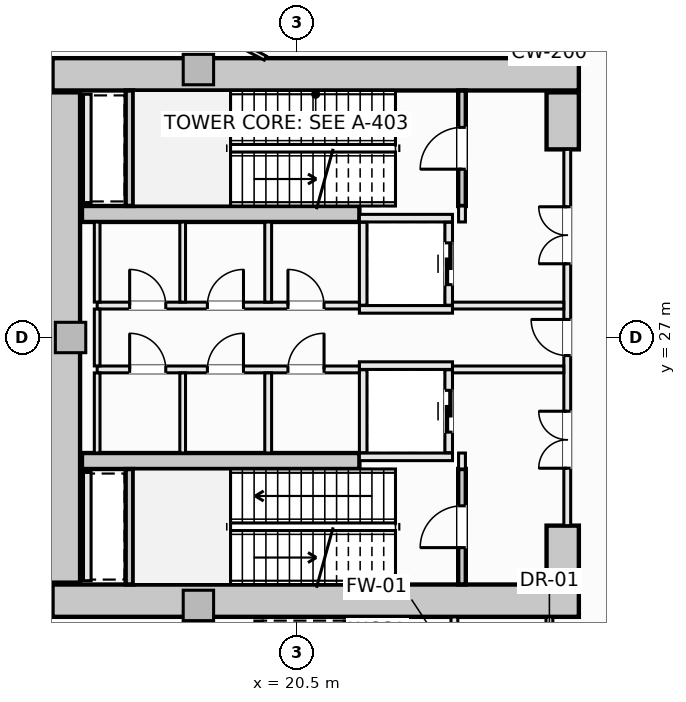
"""IFC4 building model, lengths in metres.
Left out: names, types, materials, properties, quantities, classifications, styles, units other than length and angle.
Written with IfcOpenShell. Run it as: python <this file> out.ifc"""

import sys

from ifc_helpers import new_model, si_unit, direction, frame, frame_2d, origin, origin_2d, place, context, subcontext, project, spatial, rectangle, extrude, element, fill, save


model = new_model("IFC4")
c1 = context("Model", 3, precision=1e-05, world=origin(), true_north=direction((0.0, 1.0)))
c2 = subcontext(c1, "Body", "Model", "MODEL_VIEW")
j1 = project(units=[si_unit("LENGTHUNIT", "METRE"), si_unit("PLANEANGLEUNIT", "RADIAN")], contexts=[c1])
p1 = place(None, origin())
s1 = spatial("IfcSite", under=j1, at=p1, CompositionType="ELEMENT")
p2 = place(p1, origin())
s2 = spatial("IfcBuilding", under=s1, at=p2, CompositionType="ELEMENT")
p3 = place(p2, frame((0.0, 0.0, 5.0)))
s3 = spatial("IfcBuildingStorey", under=s2, at=p3, CompositionType="ELEMENT", Elevation=5.0)
for number, where, z_axis, x_axis in (
    (1, (14.075, 33.925, -0.26), (0.0, 0.0, 1.0), (1.0, 0.0, 0.0)),
    (2, (14.075, 20.075, -0.26), (0.0, 0.0, 1.0), (1.0, 0.0, 0.0)),
):
    element("IfcWall", number, at=place(p3, frame(where, z_axis=z_axis, x_axis=x_axis)), inside=s3, PredefinedType="SHEAR", context=c2, shape_type="SweptSolid", body=[
        extrude(rectangle(XDim=13.85, YDim=0.85, at=frame_2d((6.925, 0.0))), origin(), (0.0, 0.0, 1.0), 5.0),
    ])
p4 = place(p3, frame((14.375, 20.55, -0.26), z_axis=(0.0, 0.0, 1.0), x_axis=(0.0, 1.0, 0.0)))
e3 = element("IfcWall", 3, at=p4, inside=s3, PredefinedType="SHEAR", context=c2, shape_type="SweptSolid", body=[
    extrude(rectangle(XDim=12.9, YDim=0.85, at=frame_2d((6.45, 0.0))), origin(), (0.0, 0.0, 1.0), 5.0),
])
for number, where, z_axis, x_axis in (
    (4, (27.5, 31.95, -0.26), (0.0, 0.0, 1.0), (0.0, 1.0, 0.0)),
    (5, (27.5, 20.55, -0.26), (0.0, 0.0, 1.0), (0.0, 1.0, 0.0)),
):
    element("IfcWall", number, at=place(p3, frame(where, z_axis=z_axis, x_axis=x_axis)), inside=s3, PredefinedType="SHEAR", context=c2, shape_type="SweptSolid", body=[
        extrude(rectangle(XDim=1.5, YDim=0.85, at=frame_2d((0.75, 0.0))), origin(), (0.0, 0.0, 1.0), 5.0),
    ])
for number, where, z_axis, x_axis in (
    (6, (14.85, 30.25, -0.26), (0.0, 0.0, 1.0), (1.0, 0.0, 0.0)),
    (7, (14.85, 23.75, -0.26), (0.0, 0.0, 1.0), (1.0, 0.0, 0.0)),
):
    element("IfcWall", number, at=place(p3, frame(where, z_axis=z_axis, x_axis=x_axis)), inside=s3, PredefinedType="SHEAR", context=c2, shape_type="SweptSolid", body=[
        extrude(rectangle(XDim=7.3, YDim=0.42, at=frame_2d((3.65, 0.0))), origin(), (0.0, 0.0, 1.0), 5.0),
    ])
for number, where, z_axis, x_axis in (
    (8, (17.914, 34.05, -0.26), (0.0, 0.0, 1.0), (1.0, 0.0, 0.0)),
    (9, (14.55, 27.0, -0.26), (0.0, 0.0, 1.0), (1.0, 0.0, 0.0)),
    (10, (17.914, 19.95, -0.26), (0.0, 0.0, 1.0), (1.0, 0.0, 0.0)),
):
    element("IfcColumn", number, at=place(p3, frame(where, z_axis=z_axis, x_axis=x_axis)), inside=s3, PredefinedType="PILASTER", context=c2, shape_type="SweptSolid", body=[
        extrude(rectangle(XDim=0.8, YDim=0.8, at=origin_2d()), origin(), (0.0, 0.0, 1.0), 5.0),
    ])
p5 = place(p3, frame((24.85, 30.46, -0.26), z_axis=(0.0, 0.0, 1.0), x_axis=(0.0, 1.0, 0.0)))
e11 = element("IfcWall", 11, at=p5, inside=s3, PredefinedType="SHEAR", context=c2, shape_type="SweptSolid", body=[
    extrude(rectangle(XDim=3.038, YDim=0.2, at=frame_2d((1.519, 0.0))), origin(), (0.0, 0.0, 1.0), 5.0),
])
p6 = place(p5, frame((0.969, 0.0, 0.26)))
e12 = element("IfcOpeningElement", 12, at=p6, cuts=e11, PredefinedType="OPENING", context=c2, shape_type="SweptSolid", body=[
    extrude(rectangle(XDim=1.1, YDim=2.15, at=frame_2d((0.55, 1.075))), frame((0.0, 0.11, 0.0), z_axis=(0.0, -1.0, 0.0), x_axis=(1.0, 0.0, 0.0)), (0.0, 0.0, 1.0), 0.22),
])
p7 = place(p3, frame((16.1, 30.462, -0.26), z_axis=(0.0, 0.0, 1.0), x_axis=(0.0, 1.0, 0.0)))
e13 = element("IfcWall", 13, at=p7, inside=s3, PredefinedType="SHEAR", context=c2, shape_type="SweptSolid", body=[
    extrude(rectangle(XDim=3.036, YDim=0.2, at=frame_2d((1.518, 0.0))), origin(), (0.0, 0.0, 1.0), 5.0),
])
p8 = place(p3, frame((24.85, 20.502, -0.26), z_axis=(0.0, 0.0, 1.0), x_axis=(0.0, 1.0, 0.0)))
e14 = element("IfcWall", 14, at=p8, inside=s3, PredefinedType="SHEAR", context=c2, shape_type="SweptSolid", body=[
    extrude(rectangle(XDim=3.038, YDim=0.2, at=frame_2d((1.519, 0.0))), origin(), (0.0, 0.0, 1.0), 5.0),
])
p9 = place(p8, frame((0.969, 0.0, 0.26)))
e15 = element("IfcOpeningElement", 15, at=p9, cuts=e14, PredefinedType="OPENING", context=c2, shape_type="SweptSolid", body=[
    extrude(rectangle(XDim=1.1, YDim=2.15, at=frame_2d((0.55, 1.075))), frame((0.0, 0.11, 0.0), z_axis=(0.0, -1.0, 0.0), x_axis=(1.0, 0.0, 0.0)), (0.0, 0.0, 1.0), 0.22),
])
p10 = place(p3, frame((16.1, 20.502, -0.26), z_axis=(0.0, 0.0, 1.0), x_axis=(0.0, 1.0, 0.0)))
e16 = element("IfcWall", 16, at=p10, inside=s3, PredefinedType="SHEAR", context=c2, shape_type="SweptSolid", body=[
    extrude(rectangle(XDim=3.036, YDim=0.2, at=frame_2d((1.518, 0.0))), origin(), (0.0, 0.0, 1.0), 5.0),
])
for number, where, z_axis, x_axis in (
    (17, (22.15, 30.14, 0.0), (0.0, 0.0, 1.0), (1.0, 0.0, 0.0)),
    (18, (22.15, 27.74, 0.0), (0.0, 0.0, 1.0), (1.0, 0.0, 0.0)),
):
    element("IfcWall", number, at=place(p3, frame(where, z_axis=z_axis, x_axis=x_axis)), inside=s3, PredefinedType="SOLIDWALL", context=c2, shape_type="SweptSolid", body=[
        extrude(rectangle(XDim=2.45, YDim=0.2, at=frame_2d((1.225, 0.0))), origin(), (0.0, 0.0, 1.0), 4.74),
    ])
p11 = place(p3, frame((22.25, 27.85, 0.0), z_axis=(0.0, 0.0, 1.0), x_axis=(0.0, 1.0, 0.0)))
e19 = element("IfcWall", 19, at=p11, inside=s3, PredefinedType="SOLIDWALL", context=c2, shape_type="SweptSolid", body=[
    extrude(rectangle(XDim=2.18, YDim=0.2, at=frame_2d((1.09, 0.0))), origin(), (0.0, 0.0, 1.0), 4.74),
])
p12 = place(p3, frame((24.5, 27.85, 0.0), z_axis=(0.0, 0.0, 1.0), x_axis=(0.0, 1.0, 0.0)))
e20 = element("IfcWall", 20, at=p12, inside=s3, PredefinedType="SOLIDWALL", context=c2, shape_type="SweptSolid", body=[
    extrude(rectangle(XDim=2.18, YDim=0.2, at=frame_2d((1.09, 0.0))), origin(), (0.0, 0.0, 1.0), 4.74),
])
p13 = place(p12, frame((0.54, 0.0, 0.0)))
e21 = element("IfcOpeningElement", 21, at=p13, cuts=e20, PredefinedType="OPENING", context=c2, shape_type="SweptSolid", body=[
    extrude(rectangle(XDim=1.1, YDim=2.2, at=frame_2d((0.55, 1.1))), frame((0.0, 0.11, 0.0), z_axis=(0.0, -1.0, 0.0), x_axis=(1.0, 0.0, 0.0)), (0.0, 0.0, 1.0), 0.22),
])
for number, where, z_axis, x_axis in (
    (22, (22.15, 26.26, 0.0), (0.0, 0.0, 1.0), (1.0, 0.0, 0.0)),
    (23, (22.15, 23.86, 0.0), (0.0, 0.0, 1.0), (1.0, 0.0, 0.0)),
):
    element("IfcWall", number, at=place(p3, frame(where, z_axis=z_axis, x_axis=x_axis)), inside=s3, PredefinedType="SOLIDWALL", context=c2, shape_type="SweptSolid", body=[
        extrude(rectangle(XDim=2.45, YDim=0.2, at=frame_2d((1.225, 0.0))), origin(), (0.0, 0.0, 1.0), 4.74),
    ])
p14 = place(p3, frame((22.25, 23.97, 0.0), z_axis=(0.0, 0.0, 1.0), x_axis=(0.0, 1.0, 0.0)))
e24 = element("IfcWall", 24, at=p14, inside=s3, PredefinedType="SOLIDWALL", context=c2, shape_type="SweptSolid", body=[
    extrude(rectangle(XDim=2.18, YDim=0.2, at=frame_2d((1.09, 0.0))), origin(), (0.0, 0.0, 1.0), 4.74),
])
p15 = place(p3, frame((24.5, 23.97, 0.0), z_axis=(0.0, 0.0, 1.0), x_axis=(0.0, 1.0, 0.0)))
e25 = element("IfcWall", 25, at=p15, inside=s3, PredefinedType="SOLIDWALL", context=c2, shape_type="SweptSolid", body=[
    extrude(rectangle(XDim=2.18, YDim=0.2, at=frame_2d((1.09, 0.0))), origin(), (0.0, 0.0, 1.0), 4.74),
])
p16 = place(p15, frame((0.54, 0.0, 0.0)))
e26 = element("IfcOpeningElement", 26, at=p16, cuts=e25, PredefinedType="OPENING", context=c2, shape_type="SweptSolid", body=[
    extrude(rectangle(XDim=1.1, YDim=2.2, at=frame_2d((0.55, 1.1))), frame((0.0, 0.11, 0.0), z_axis=(0.0, -1.0, 0.0), x_axis=(1.0, 0.0, 0.0)), (0.0, 0.0, 1.0), 0.22),
])
for number, where, z_axis, x_axis in (
    (27, (19.5, 17.01, 0.0), (0.0, 0.0, 1.0), (0.0, 1.0, 0.0)),
    (28, (21.85, 17.01, 0.0), (0.0, 0.0, 1.0), (0.0, 1.0, 0.0)),
):
    element("IfcWall", number, at=place(p3, frame(where, z_axis=z_axis, x_axis=x_axis)), inside=s3, PredefinedType="SOLIDWALL", context=c2, shape_type="SweptSolid", body=[
        extrude(rectangle(XDim=2.53, YDim=0.2, at=frame_2d((1.265, 0.0))), origin(), (0.0, 0.0, 1.0), 4.74),
    ])
for number, where, z_axis, x_axis in (
    (29, (14.99, 30.55, 0.0), (0.0, 0.0, 1.0), (0.0, 1.0, 0.0)),
    (30, (14.99, 20.6, 0.0), (0.0, 0.0, 1.0), (0.0, 1.0, 0.0)),
):
    element("IfcWall", number, at=place(p3, frame(where, z_axis=z_axis, x_axis=x_axis)), inside=s3, PredefinedType="SOLIDWALL", context=c2, shape_type="SweptSolid", body=[
        extrude(rectangle(XDim=2.85, YDim=0.2, at=frame_2d((1.425, 0.0))), origin(), (0.0, 0.0, 1.0), 4.74),
    ])
for number, where, z_axis, x_axis in (
    (31, (24.85, 23.54, 0.0), (0.0, 0.0, 1.0), (0.0, 1.0, 0.0)),
    (32, (24.85, 30.04, 0.0), (0.0, 0.0, 1.0), (0.0, 1.0, 0.0)),
):
    element("IfcWall", number, at=place(p3, frame(where, z_axis=z_axis, x_axis=x_axis)), inside=s3, PredefinedType="SOLIDWALL", context=c2, shape_type="SweptSolid", body=[
        extrude(rectangle(XDim=0.42, YDim=0.18, at=frame_2d((0.21, 0.0))), origin(), (0.0, 0.0, 1.0), 4.74),
    ])
p17 = place(p3, frame((27.62, 22.05, 0.0), z_axis=(0.0, 0.0, 1.0), x_axis=(0.0, 1.0, 0.0)))
e33 = element("IfcWall", 33, at=p17, inside=s3, PredefinedType="SOLIDWALL", context=c2, shape_type="SweptSolid", body=[
    extrude(rectangle(XDim=9.9, YDim=0.18, at=frame_2d((4.95, 0.0))), origin(), (0.0, 0.0, 1.0), 3.832),
])
p18 = place(p17, frame((4.475, 0.0, 0.0)))
e34 = element("IfcOpeningElement", 34, at=p18, cuts=e33, PredefinedType="OPENING", context=c2, shape_type="SweptSolid", body=[
    extrude(rectangle(XDim=0.95, YDim=2.1, at=frame_2d((0.475, 1.05))), frame((0.0, 0.1, 0.0), z_axis=(0.0, -1.0, 0.0), x_axis=(1.0, 0.0, 0.0)), (0.0, 0.0, 1.0), 0.2),
])
p19 = place(p17, frame((6.89, 0.0, 0.0)))
e35 = element("IfcOpeningElement", 35, at=p19, cuts=e33, PredefinedType="OPENING", context=c2, shape_type="SweptSolid", body=[
    extrude(rectangle(XDim=1.5, YDim=2.2, at=frame_2d((0.75, 1.1))), frame((0.0, 0.1, 0.0), z_axis=(0.0, -1.0, 0.0), x_axis=(1.0, 0.0, 0.0)), (0.0, 0.0, 1.0), 0.2),
])
p20 = place(p17, frame((1.51, 0.0, 0.0)))
e36 = element("IfcOpeningElement", 36, at=p20, cuts=e33, PredefinedType="OPENING", context=c2, shape_type="SweptSolid", body=[
    extrude(rectangle(XDim=1.5, YDim=2.2, at=frame_2d((0.75, 1.1))), frame((0.0, 0.1, 0.0), z_axis=(0.0, -1.0, 0.0), x_axis=(1.0, 0.0, 0.0)), (0.0, 0.0, 1.0), 0.2),
])
p21 = place(p3, frame((15.25, 27.84, 0.0), z_axis=(0.0, 0.0, 1.0), x_axis=(1.0, 0.0, 0.0)))
e37 = element("IfcWall", 37, at=p21, inside=s3, PredefinedType="SOLIDWALL", context=c2, shape_type="SweptSolid", body=[
    extrude(rectangle(XDim=6.9, YDim=0.18, at=frame_2d((3.45, 0.0))), origin(), (0.0, 0.0, 1.0), 4.74),
])
p22 = place(p21, frame((5.02, 0.0, 0.0)))
e38 = element("IfcOpeningElement", 38, at=p22, cuts=e37, PredefinedType="OPENING", context=c2, shape_type="SweptSolid", body=[
    extrude(rectangle(XDim=0.95, YDim=2.1, at=frame_2d((0.475, 1.05))), frame((0.0, 0.1, 0.0), z_axis=(0.0, -1.0, 0.0), x_axis=(1.0, 0.0, 0.0)), (0.0, 0.0, 1.0), 0.2),
])
p23 = place(p21, frame((0.855, 0.0, 0.0)))
e39 = element("IfcOpeningElement", 39, at=p23, cuts=e37, PredefinedType="OPENING", context=c2, shape_type="SweptSolid", body=[
    extrude(rectangle(XDim=0.95, YDim=2.1, at=frame_2d((0.475, 1.05))), frame((0.0, 0.1, 0.0), z_axis=(0.0, -1.0, 0.0), x_axis=(1.0, 0.0, 0.0)), (0.0, 0.0, 1.0), 0.2),
])
p24 = place(p21, frame((2.9, 0.0, 0.0)))
e40 = element("IfcOpeningElement", 40, at=p24, cuts=e37, PredefinedType="OPENING", context=c2, shape_type="SweptSolid", body=[
    extrude(rectangle(XDim=0.95, YDim=2.1, at=frame_2d((0.475, 1.05))), frame((0.0, 0.1, 0.0), z_axis=(0.0, -1.0, 0.0), x_axis=(1.0, 0.0, 0.0)), (0.0, 0.0, 1.0), 0.2),
])
p25 = place(p3, frame((24.6, 27.84, 0.0), z_axis=(0.0, 0.0, 1.0), x_axis=(1.0, 0.0, 0.0)))
e41 = element("IfcWall", 41, at=p25, inside=s3, PredefinedType="SOLIDWALL", context=c2, shape_type="SweptSolid", body=[
    extrude(rectangle(XDim=2.928, YDim=0.18, at=frame_2d((1.464, 0.0))), origin(), (0.0, 0.0, 1.0), 4.74),
])
p26 = place(p3, frame((15.25, 26.16, 0.0), z_axis=(0.0, 0.0, 1.0), x_axis=(1.0, 0.0, 0.0)))
e42 = element("IfcWall", 42, at=p26, inside=s3, PredefinedType="SOLIDWALL", context=c2, shape_type="SweptSolid", body=[
    extrude(rectangle(XDim=6.9, YDim=0.18, at=frame_2d((3.45, 0.0))), origin(), (0.0, 0.0, 1.0), 4.74),
])
p27 = place(p26, frame((5.02, 0.0, 0.0)))
e43 = element("IfcOpeningElement", 43, at=p27, cuts=e42, PredefinedType="OPENING", context=c2, shape_type="SweptSolid", body=[
    extrude(rectangle(XDim=0.95, YDim=2.1, at=frame_2d((0.475, 1.05))), frame((0.0, 0.1, 0.0), z_axis=(0.0, -1.0, 0.0), x_axis=(1.0, 0.0, 0.0)), (0.0, 0.0, 1.0), 0.2),
])
p28 = place(p26, frame((0.855, 0.0, 0.0)))
e44 = element("IfcOpeningElement", 44, at=p28, cuts=e42, PredefinedType="OPENING", context=c2, shape_type="SweptSolid", body=[
    extrude(rectangle(XDim=0.95, YDim=2.1, at=frame_2d((0.475, 1.05))), frame((0.0, 0.1, 0.0), z_axis=(0.0, -1.0, 0.0), x_axis=(1.0, 0.0, 0.0)), (0.0, 0.0, 1.0), 0.2),
])
p29 = place(p26, frame((2.9, 0.0, 0.0)))
e45 = element("IfcOpeningElement", 45, at=p29, cuts=e42, PredefinedType="OPENING", context=c2, shape_type="SweptSolid", body=[
    extrude(rectangle(XDim=0.95, YDim=2.1, at=frame_2d((0.475, 1.05))), frame((0.0, 0.1, 0.0), z_axis=(0.0, -1.0, 0.0), x_axis=(1.0, 0.0, 0.0)), (0.0, 0.0, 1.0), 0.2),
])
p30 = place(p3, frame((24.6, 26.16, 0.0), z_axis=(0.0, 0.0, 1.0), x_axis=(1.0, 0.0, 0.0)))
e46 = element("IfcWall", 46, at=p30, inside=s3, PredefinedType="SOLIDWALL", context=c2, shape_type="SweptSolid", body=[
    extrude(rectangle(XDim=2.928, YDim=0.18, at=frame_2d((1.464, 0.0))), origin(), (0.0, 0.0, 1.0), 4.74),
])
p31 = place(p3, frame((15.25, 23.962, 0.0), z_axis=(0.0, 0.0, 1.0), x_axis=(0.0, 1.0, 0.0)))
e47 = element("IfcWall", 47, at=p31, inside=s3, PredefinedType="PARTITIONING", context=c2, shape_type="SweptSolid", body=[
    extrude(rectangle(XDim=2.106, YDim=0.15, at=frame_2d((1.053, 0.0))), origin(), (0.0, 0.0, 1.0), 4.74),
])
p32 = place(p3, frame((15.25, 26.252, 0.0), z_axis=(0.0, 0.0, 1.0), x_axis=(0.0, 1.0, 0.0)))
e48 = element("IfcWall", 48, at=p32, inside=s3, PredefinedType="PARTITIONING", context=c2, shape_type="SweptSolid", body=[
    extrude(rectangle(XDim=1.496, YDim=0.15, at=frame_2d((0.748, 0.0))), origin(), (0.0, 0.0, 1.0), 4.74),
])
p33 = place(p3, frame((15.25, 27.932, 0.0), z_axis=(0.0, 0.0, 1.0), x_axis=(0.0, 1.0, 0.0)))
e49 = element("IfcWall", 49, at=p33, inside=s3, PredefinedType="PARTITIONING", context=c2, shape_type="SweptSolid", body=[
    extrude(rectangle(XDim=2.106, YDim=0.15, at=frame_2d((1.053, 0.0))), origin(), (0.0, 0.0, 1.0), 4.74),
])
for number, where, z_axis, x_axis in (
    (50, (19.75, 23.962, 0.0), (0.0, 0.0, 1.0), (0.0, 1.0, 0.0)),
    (51, (19.75, 27.932, 0.0), (0.0, 0.0, 1.0), (0.0, 1.0, 0.0)),
):
    element("IfcWall", number, at=place(p3, frame(where, z_axis=z_axis, x_axis=x_axis)), inside=s3, PredefinedType="SOLIDWALL", context=c2, shape_type="SweptSolid", body=[
        extrude(rectangle(XDim=2.106, YDim=0.18, at=frame_2d((1.053, 0.0))), origin(), (0.0, 0.0, 1.0), 4.74),
    ])
for number, where, z_axis, x_axis in (
    (52, (17.5, 23.962, 0.0), (0.0, 0.0, 1.0), (0.0, 1.0, 0.0)),
    (53, (17.5, 27.932, 0.0), (0.0, 0.0, 1.0), (0.0, 1.0, 0.0)),
):
    element("IfcWall", number, at=place(p3, frame(where, z_axis=z_axis, x_axis=x_axis)), inside=s3, PredefinedType="PARTITIONING", context=c2, shape_type="SweptSolid", body=[
        extrude(rectangle(XDim=2.106, YDim=0.15, at=frame_2d((1.053, 0.0))), origin(), (0.0, 0.0, 1.0), 4.74),
    ])
p34 = place(p3, frame((22.15, 17.142, 0.0), z_axis=(0.0, 0.0, 1.0), x_axis=(0.0, 1.0, 0.0)))
e54 = element("IfcWall", 54, at=p34, inside=s3, PredefinedType="PARTITIONING", context=c2, shape_type="SweptSolid", body=[
    extrude(rectangle(XDim=2.506, YDim=0.15, at=frame_2d((1.253, 0.0))), origin(), (0.0, 0.0, 1.0), 4.74),
])
p35 = place(p3, frame((24.65, 17.142, 0.0), z_axis=(0.0, 0.0, 1.0), x_axis=(0.0, 1.0, 0.0)))
e55 = element("IfcWall", 55, at=p35, inside=s3, PredefinedType="SOLIDWALL", context=c2, shape_type="SweptSolid", body=[
    extrude(rectangle(XDim=2.506, YDim=0.18, at=frame_2d((1.253, 0.0))), origin(), (0.0, 0.0, 1.0), 4.74),
])
p36 = place(p35, frame((0.778, 0.0, 0.0)))
e56 = element("IfcOpeningElement", 56, at=p36, cuts=e55, PredefinedType="OPENING", context=c2, shape_type="SweptSolid", body=[
    extrude(rectangle(XDim=0.95, YDim=2.1, at=frame_2d((0.475, 1.05))), frame((0.0, 0.1, 0.0), z_axis=(0.0, -1.0, 0.0), x_axis=(1.0, 0.0, 0.0)), (0.0, 0.0, 1.0), 0.2),
])
p37 = place(p3, frame((27.15, 17.142, 0.0), z_axis=(0.0, 0.0, 1.0), x_axis=(0.0, 1.0, 0.0)))
e57 = element("IfcWall", 57, at=p37, inside=s3, PredefinedType="SOLIDWALL", context=c2, shape_type="SweptSolid", body=[
    extrude(rectangle(XDim=2.506, YDim=0.18, at=frame_2d((1.253, 0.0))), origin(), (0.0, 0.0, 1.0), 4.74),
])
p38 = place(p37, frame((0.778, 0.0, 0.0)))
e58 = element("IfcOpeningElement", 58, at=p38, cuts=e57, PredefinedType="OPENING", context=c2, shape_type="SweptSolid", body=[
    extrude(rectangle(XDim=0.95, YDim=2.1, at=frame_2d((0.475, 1.05))), frame((0.0, 0.1, 0.0), z_axis=(0.0, -1.0, 0.0), x_axis=(1.0, 0.0, 0.0)), (0.0, 0.0, 1.0), 0.2),
])
p39 = place(p3, frame((27.25, 34.352, 0.0), z_axis=(0.0, 0.0, 1.0), x_axis=(0.0, 1.0, 0.0)))
e59 = element("IfcWall", 59, at=p39, inside=s3, PredefinedType="PARTITIONING", context=c2, shape_type="SweptSolid", body=[
    extrude(rectangle(XDim=0.606, YDim=0.12, at=frame_2d((0.303, 0.0))), origin(), (0.0, 0.0, 1.0), 4.74),
])
p40 = place(p3, frame((18.533, 34.958, 0.0), z_axis=(0.0, 0.0, 1.0), x_axis=(0.883032467315, -0.469311902329, 0.0)))
e60 = element("IfcWall", 60, at=p40, inside=s3, PredefinedType="PARTITIONING", context=c2, shape_type="SweptSolid", body=[
    extrude(rectangle(XDim=1.291, YDim=0.12, at=frame_2d((0.646, 0.0))), origin(), (0.0, 0.0, 1.0), 4.74),
])
p41 = place(p6, origin())
e61 = element("IfcDoor", 61, at=p41, inside=s3, OperationType="SINGLE_SWING_LEFT", PredefinedType="DOOR", context=c2, shape_type="SweptSolid", body=[
    extrude(rectangle(XDim=1.1, YDim=2.15, at=frame_2d((0.55, 1.075))), frame((0.0, 0.025, 0.0), z_axis=(0.0, -1.0, 0.0), x_axis=(1.0, 0.0, 0.0)), (0.0, 0.0, 1.0), 0.05),
])
fill(e12, e61)
p42 = place(p9, origin())
e62 = element("IfcDoor", 62, at=p42, inside=s3, OperationType="SINGLE_SWING_LEFT", PredefinedType="DOOR", context=c2, shape_type="SweptSolid", body=[
    extrude(rectangle(XDim=1.1, YDim=2.15, at=frame_2d((0.55, 1.075))), frame((0.0, 0.025, 0.0), z_axis=(0.0, -1.0, 0.0), x_axis=(1.0, 0.0, 0.0)), (0.0, 0.0, 1.0), 0.05),
])
fill(e15, e62)
p43 = place(p13, origin())
e63 = element("IfcDoor", 63, at=p43, inside=s3, OperationType="SLIDING_TO_LEFT", PredefinedType="DOOR", context=c2, shape_type="SweptSolid", body=[
    extrude(rectangle(XDim=1.1, YDim=2.2, at=frame_2d((0.55, 1.1))), frame((0.0, 0.025, 0.0), z_axis=(0.0, -1.0, 0.0), x_axis=(1.0, 0.0, 0.0)), (0.0, 0.0, 1.0), 0.05),
])
fill(e21, e63)
p44 = place(p16, origin())
e64 = element("IfcDoor", 64, at=p44, inside=s3, OperationType="SLIDING_TO_LEFT", PredefinedType="DOOR", context=c2, shape_type="SweptSolid", body=[
    extrude(rectangle(XDim=1.1, YDim=2.2, at=frame_2d((0.55, 1.1))), frame((0.0, 0.025, 0.0), z_axis=(0.0, -1.0, 0.0), x_axis=(1.0, 0.0, 0.0)), (0.0, 0.0, 1.0), 0.05),
])
fill(e26, e64)
p45 = place(p18, origin())
e65 = element("IfcDoor", 65, at=p45, inside=s3, OperationType="SINGLE_SWING_RIGHT", PredefinedType="DOOR", context=c2, shape_type="SweptSolid", body=[
    extrude(rectangle(XDim=0.95, YDim=2.1, at=frame_2d((0.475, 1.05))), frame((0.0, 0.025, 0.0), z_axis=(0.0, -1.0, 0.0), x_axis=(1.0, 0.0, 0.0)), (0.0, 0.0, 1.0), 0.05),
])
fill(e34, e65)
p46 = place(p19, origin())
e66 = element("IfcDoor", 66, at=p46, inside=s3, OperationType="DOUBLE_DOOR_SINGLE_SWING", PredefinedType="DOOR", context=c2, shape_type="SweptSolid", body=[
    extrude(rectangle(XDim=1.5, YDim=2.2, at=frame_2d((0.75, 1.1))), frame((0.0, 0.025, 0.0), z_axis=(0.0, -1.0, 0.0), x_axis=(1.0, 0.0, 0.0)), (0.0, 0.0, 1.0), 0.05),
])
fill(e35, e66)
p47 = place(p20, origin())
e67 = element("IfcDoor", 67, at=p47, inside=s3, OperationType="DOUBLE_DOOR_SINGLE_SWING", PredefinedType="DOOR", context=c2, shape_type="SweptSolid", body=[
    extrude(rectangle(XDim=1.5, YDim=2.2, at=frame_2d((0.75, 1.1))), frame((0.0, 0.025, 0.0), z_axis=(0.0, -1.0, 0.0), x_axis=(1.0, 0.0, 0.0)), (0.0, 0.0, 1.0), 0.05),
])
fill(e36, e67)
p48 = place(p22, origin())
e68 = element("IfcDoor", 68, at=p48, inside=s3, OperationType="SINGLE_SWING_LEFT", PredefinedType="DOOR", context=c2, shape_type="SweptSolid", body=[
    extrude(rectangle(XDim=0.95, YDim=2.1, at=frame_2d((0.475, 1.05))), frame((0.0, 0.025, 0.0), z_axis=(0.0, -1.0, 0.0), x_axis=(1.0, 0.0, 0.0)), (0.0, 0.0, 1.0), 0.05),
])
fill(e38, e68)
p49 = place(p27, origin())
e69 = element("IfcDoor", 69, at=p49, inside=s3, OperationType="SINGLE_SWING_RIGHT", PredefinedType="DOOR", context=c2, shape_type="SweptSolid", body=[
    extrude(rectangle(XDim=0.95, YDim=2.1, at=frame_2d((0.475, 1.05))), frame((0.0, 0.025, 0.0), z_axis=(0.0, -1.0, 0.0), x_axis=(1.0, 0.0, 0.0)), (0.0, 0.0, 1.0), 0.05),
])
fill(e43, e69)
p50 = place(p23, origin())
e70 = element("IfcDoor", 70, at=p50, inside=s3, OperationType="SINGLE_SWING_LEFT", PredefinedType="DOOR", context=c2, shape_type="SweptSolid", body=[
    extrude(rectangle(XDim=0.95, YDim=2.1, at=frame_2d((0.475, 1.05))), frame((0.0, 0.025, 0.0), z_axis=(0.0, -1.0, 0.0), x_axis=(1.0, 0.0, 0.0)), (0.0, 0.0, 1.0), 0.05),
])
fill(e39, e70)
p51 = place(p24, origin())
e71 = element("IfcDoor", 71, at=p51, inside=s3, OperationType="SINGLE_SWING_RIGHT", PredefinedType="DOOR", context=c2, shape_type="SweptSolid", body=[
    extrude(rectangle(XDim=0.95, YDim=2.1, at=frame_2d((0.475, 1.05))), frame((0.0, 0.025, 0.0), z_axis=(0.0, -1.0, 0.0), x_axis=(1.0, 0.0, 0.0)), (0.0, 0.0, 1.0), 0.05),
])
fill(e40, e71)
p52 = place(p28, origin())
e72 = element("IfcDoor", 72, at=p52, inside=s3, OperationType="SINGLE_SWING_LEFT", PredefinedType="DOOR", context=c2, shape_type="SweptSolid", body=[
    extrude(rectangle(XDim=0.95, YDim=2.1, at=frame_2d((0.475, 1.05))), frame((0.0, 0.025, 0.0), z_axis=(0.0, -1.0, 0.0), x_axis=(1.0, 0.0, 0.0)), (0.0, 0.0, 1.0), 0.05),
])
fill(e44, e72)
p53 = place(p29, origin())
e73 = element("IfcDoor", 73, at=p53, inside=s3, OperationType="SINGLE_SWING_RIGHT", PredefinedType="DOOR", context=c2, shape_type="SweptSolid", body=[
    extrude(rectangle(XDim=0.95, YDim=2.1, at=frame_2d((0.475, 1.05))), frame((0.0, 0.025, 0.0), z_axis=(0.0, -1.0, 0.0), x_axis=(1.0, 0.0, 0.0)), (0.0, 0.0, 1.0), 0.05),
])
fill(e45, e73)
save(model, sys.argv[1])
